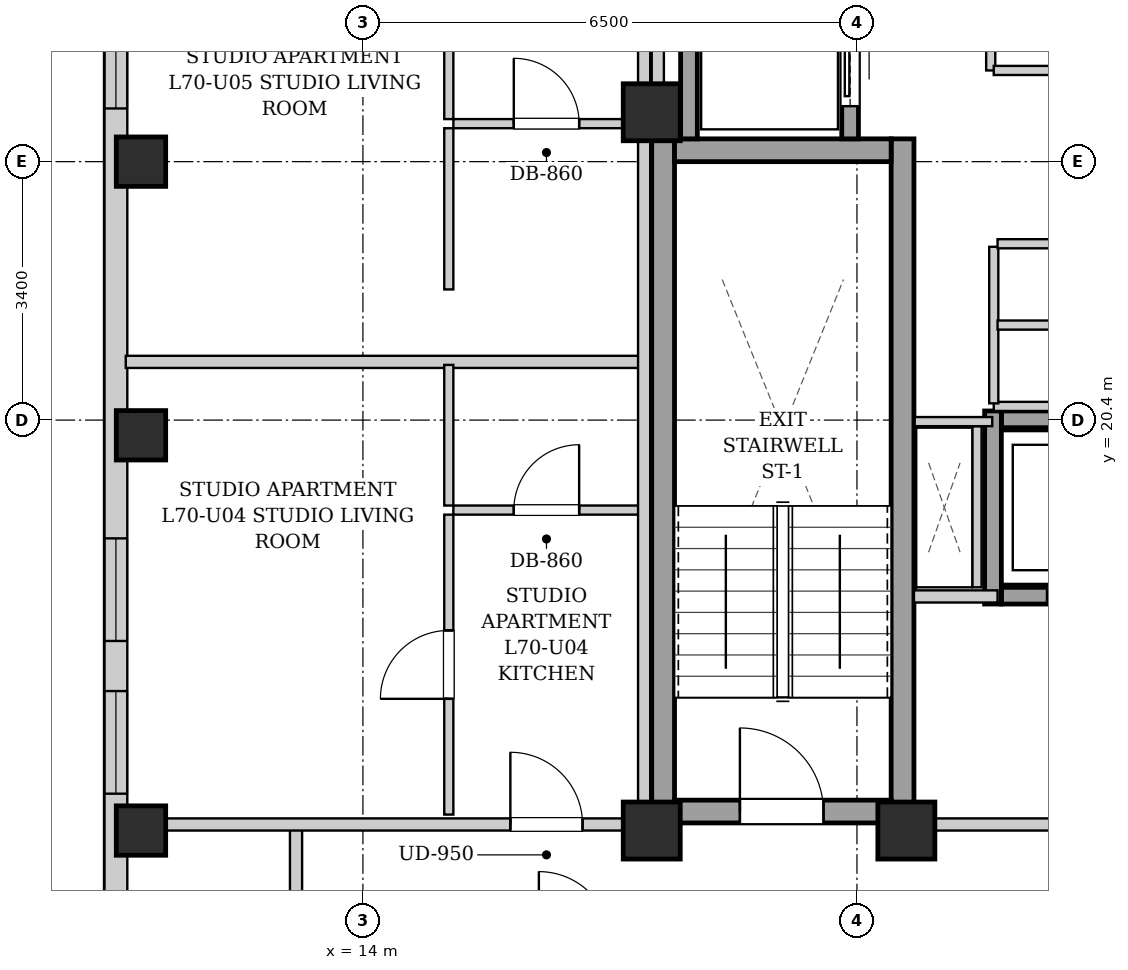
"""IFC4 building model, lengths in metres.
Left out: names, types, materials, properties, quantities, classifications, styles, units other than length and angle.
Written with IfcOpenShell. Run it as: python <this file> out.ifc"""

import sys

from ifc_helpers import new_model, si_unit, direction, frame, frame_2d, origin, origin_2d, place, context, subcontext, project, spatial, rectangle, extrude, element, fill, save


model = new_model("IFC4")
c1 = context("Model", 3, precision=1e-05, world=origin(), true_north=direction((0.0, 1.0)))
c2 = subcontext(c1, "Body", "Model", "MODEL_VIEW")
j1 = project(units=[si_unit("LENGTHUNIT", "METRE"), si_unit("PLANEANGLEUNIT", "RADIAN")], contexts=[c1])
p1 = place(None, origin())
s1 = spatial("IfcSite", under=j1, at=p1, CompositionType="ELEMENT")
p2 = place(p1, origin())
s2 = spatial("IfcBuilding", under=s1, at=p2, CompositionType="ELEMENT")
p3 = place(p2, frame((0.0, 0.0, 241.1)))
s3 = spatial("IfcBuildingStorey", under=s2, at=p3, CompositionType="ELEMENT", Elevation=241.1)
for number, where, z_axis, x_axis in (
    (1, (11.08, 15.0, 0.0), (0.0, 0.0, 1.0), (1.0, 0.0, 0.0)),
    (2, (11.08, 20.2, 0.0), (0.0, 0.0, 1.0), (1.0, 0.0, 0.0)),
    (3, (11.08, 23.8, 0.0), (0.0, 0.0, 1.0), (1.0, 0.0, 0.0)),
):
    element("IfcColumn", number, at=place(p3, frame(where, z_axis=z_axis, x_axis=x_axis)), inside=s3, PredefinedType="COLUMN", context=c2, shape_type="SweptSolid", body=[
        extrude(rectangle(XDim=0.65, YDim=0.65, at=origin_2d()), origin(), (0.0, 0.0, 1.0), 3.4),
    ])
for number, where, z_axis, x_axis in (
    (4, (17.8, 15.0, 0.0), (0.0, 0.0, 1.0), (1.0, 0.0, 0.0)),
    (5, (21.15, 15.0, 0.0), (0.0, 0.0, 1.0), (1.0, 0.0, 0.0)),
    (6, (17.8, 24.45, 0.0), (0.0, 0.0, 1.0), (1.0, 0.0, 0.0)),
):
    element("IfcColumn", number, at=place(p3, frame(where, z_axis=z_axis, x_axis=x_axis)), inside=s3, PredefinedType="COLUMN", context=c2, shape_type="SweptSolid", body=[
        extrude(rectangle(XDim=0.75, YDim=0.75, at=origin_2d()), origin(), (0.0, 0.0, 1.0), 3.4),
    ])
p4 = place(p3, frame((10.75, 6.3, 0.0), z_axis=(0.0, 0.0, 1.0), x_axis=(0.0, 1.0, 0.0)))
e7 = element("IfcWall", 7, at=p4, inside=s3, PredefinedType="SOLIDWALL", context=c2, shape_type="SweptSolid", body=[
    extrude(rectangle(XDim=31.4, YDim=0.3, at=frame_2d((15.7, 0.0))), origin(), (0.0, 0.0, 1.0), 3.14),
])
p5 = place(p4, frame((1.653, 0.0, 0.55)))
e8 = element("IfcOpeningElement", 8, at=p5, cuts=e7, PredefinedType="OPENING", context=c2, shape_type="SweptSolid", body=[
    extrude(rectangle(XDim=1.35, YDim=1.2, at=frame_2d((0.675, 0.6))), frame((0.0, 0.16, 0.0), z_axis=(0.0, -1.0, 0.0), x_axis=(1.0, 0.0, 0.0)), (0.0, 0.0, 1.0), 0.32),
])
p6 = place(p4, frame((11.194, 0.0, 0.55)))
e9 = element("IfcOpeningElement", 9, at=p6, cuts=e7, PredefinedType="OPENING", context=c2, shape_type="SweptSolid", body=[
    extrude(rectangle(XDim=1.35, YDim=1.2, at=frame_2d((0.675, 0.6))), frame((0.0, 0.16, 0.0), z_axis=(0.0, -1.0, 0.0), x_axis=(1.0, 0.0, 0.0)), (0.0, 0.0, 1.0), 0.32),
])
p7 = place(p4, frame((9.185, 0.0, 0.55)))
e10 = element("IfcOpeningElement", 10, at=p7, cuts=e7, PredefinedType="OPENING", context=c2, shape_type="SweptSolid", body=[
    extrude(rectangle(XDim=1.35, YDim=1.2, at=frame_2d((0.675, 0.6))), frame((0.0, 0.16, 0.0), z_axis=(0.0, -1.0, 0.0), x_axis=(1.0, 0.0, 0.0)), (0.0, 0.0, 1.0), 0.32),
])
p8 = place(p4, frame((18.2, 0.0, 0.55)))
e11 = element("IfcOpeningElement", 11, at=p8, cuts=e7, PredefinedType="OPENING", context=c2, shape_type="SweptSolid", body=[
    extrude(rectangle(XDim=1.35, YDim=1.2, at=frame_2d((0.675, 0.6))), frame((0.0, 0.16, 0.0), z_axis=(0.0, -1.0, 0.0), x_axis=(1.0, 0.0, 0.0)), (0.0, 0.0, 1.0), 0.32),
])
p9 = place(p4, frame((19.81, 0.0, 0.55)))
e12 = element("IfcOpeningElement", 12, at=p9, cuts=e7, PredefinedType="OPENING", context=c2, shape_type="SweptSolid", body=[
    extrude(rectangle(XDim=1.35, YDim=1.2, at=frame_2d((0.675, 0.6))), frame((0.0, 0.16, 0.0), z_axis=(0.0, -1.0, 0.0), x_axis=(1.0, 0.0, 0.0)), (0.0, 0.0, 1.0), 0.32),
])
for number, where, z_axis, x_axis in (
    (13, (17.95, 15.1, 0.0), (0.0, 0.0, 1.0), (0.0, 1.0, 0.0)),
    (14, (21.1, 15.1, 0.0), (0.0, 0.0, 1.0), (0.0, 1.0, 0.0)),
):
    element("IfcWall", number, at=place(p3, frame(where, z_axis=z_axis, x_axis=x_axis)), inside=s3, PredefinedType="SHEAR", context=c2, shape_type="SweptSolid", body=[
        extrude(rectangle(XDim=9.0, YDim=0.3, at=frame_2d((4.5, 0.0))), origin(), (0.0, 0.0, 1.0), 3.14),
    ])
p10 = place(p3, frame((18.1, 23.95, 0.0), z_axis=(0.0, 0.0, 1.0), x_axis=(1.0, 0.0, 0.0)))
e15 = element("IfcWall", 15, at=p10, inside=s3, PredefinedType="SHEAR", context=c2, shape_type="SweptSolid", body=[
    extrude(rectangle(XDim=2.85, YDim=0.3, at=frame_2d((1.425, 0.0))), origin(), (0.0, 0.0, 1.0), 3.14),
])
p11 = place(p3, frame((18.1, 15.25, 0.0), z_axis=(0.0, 0.0, 1.0), x_axis=(1.0, 0.0, 0.0)))
e16 = element("IfcWall", 16, at=p11, inside=s3, PredefinedType="SHEAR", context=c2, shape_type="SweptSolid", body=[
    extrude(rectangle(XDim=2.85, YDim=0.3, at=frame_2d((1.425, 0.0))), origin(), (0.0, 0.0, 1.0), 3.14),
])
p12 = place(p11, frame((0.86, 0.0, 0.0)))
e17 = element("IfcOpeningElement", 17, at=p12, cuts=e16, PredefinedType="OPENING", context=c2, shape_type="SweptSolid", body=[
    extrude(rectangle(XDim=1.1, YDim=2.05, at=frame_2d((0.55, 1.025))), frame((0.0, 0.16, 0.0), z_axis=(0.0, -1.0, 0.0), x_axis=(1.0, 0.0, 0.0)), (0.0, 0.0, 1.0), 0.32),
])
p13 = place(p3, frame((18.29, 24.1, 0.0), z_axis=(0.0, 0.0, 1.0), x_axis=(0.0, 1.0, 0.0)))
e18 = element("IfcWall", 18, at=p13, inside=s3, PredefinedType="SHEAR", context=c2, shape_type="SweptSolid", body=[
    extrude(rectangle(XDim=4.14, YDim=0.22, at=frame_2d((2.07, 0.0))), origin(), (0.0, 0.0, 1.0), 3.14),
])
p14 = place(p3, frame((20.41, 24.1, 0.0), z_axis=(0.0, 0.0, 1.0), x_axis=(0.0, 1.0, 0.0)))
e19 = element("IfcWall", 19, at=p14, inside=s3, PredefinedType="SHEAR", context=c2, shape_type="SweptSolid", body=[
    extrude(rectangle(XDim=1.96, YDim=0.22, at=frame_2d((0.98, 0.0))), origin(), (0.0, 0.0, 1.0), 3.14),
])
p15 = place(p14, frame((0.43, 0.0, 0.0)))
e20 = element("IfcOpeningElement", 20, at=p15, cuts=e19, PredefinedType="OPENING", context=c2, shape_type="SweptSolid", body=[
    extrude(rectangle(XDim=1.1, YDim=2.15, at=frame_2d((0.55, 1.075))), frame((0.0, 0.12, 0.0), z_axis=(0.0, -1.0, 0.0), x_axis=(1.0, 0.0, 0.0)), (0.0, 0.0, 1.0), 0.24),
])
p16 = place(p3, frame((22.4, 18.09, 0.0), z_axis=(0.0, 0.0, 1.0), x_axis=(1.0, 0.0, 0.0)))
e21 = element("IfcWall", 21, at=p16, inside=s3, PredefinedType="SHEAR", context=c2, shape_type="SweptSolid", body=[
    extrude(rectangle(XDim=2.4, YDim=0.22, at=frame_2d((1.2, 0.0))), origin(), (0.0, 0.0, 1.0), 3.14),
])
p17 = place(p16, frame((0.6, 0.0, 0.0)))
e22 = element("IfcOpeningElement", 22, at=p17, cuts=e21, PredefinedType="OPENING", context=c2, shape_type="SweptSolid", body=[
    extrude(rectangle(XDim=1.2, YDim=2.15, at=frame_2d((0.6, 1.075))), frame((0.0, 0.12, 0.0), z_axis=(0.0, -1.0, 0.0), x_axis=(1.0, 0.0, 0.0)), (0.0, 0.0, 1.0), 0.24),
])
p18 = place(p3, frame((22.4, 20.41, 0.0), z_axis=(0.0, 0.0, 1.0), x_axis=(1.0, 0.0, 0.0)))
e23 = element("IfcWall", 23, at=p18, inside=s3, PredefinedType="SHEAR", context=c2, shape_type="SweptSolid", body=[
    extrude(rectangle(XDim=2.4, YDim=0.22, at=frame_2d((1.2, 0.0))), origin(), (0.0, 0.0, 1.0), 3.14),
])
p19 = place(p3, frame((22.29, 17.98, 0.0), z_axis=(0.0, 0.0, 1.0), x_axis=(0.0, 1.0, 0.0)))
e24 = element("IfcWall", 24, at=p19, inside=s3, PredefinedType="SHEAR", context=c2, shape_type="SweptSolid", body=[
    extrude(rectangle(XDim=2.54, YDim=0.22, at=frame_2d((1.27, 0.0))), origin(), (0.0, 0.0, 1.0), 3.14),
])
p20 = place(p3, frame((21.25, 15.08, 0.0), z_axis=(0.0, 0.0, 1.0), x_axis=(1.0, 0.0, 0.0)))
e25 = element("IfcWall", 25, at=p20, inside=s3, PredefinedType="PARTITIONING", context=c2, shape_type="SweptSolid", body=[
    extrude(rectangle(XDim=8.5, YDim=0.16, at=frame_2d((4.25, 0.0))), origin(), (0.0, 0.0, 1.0), 2.668),
])
p21 = place(p20, frame((3.725, 0.0, 0.0)))
e26 = element("IfcOpeningElement", 26, at=p21, cuts=e25, PredefinedType="OPENING", context=c2, shape_type="SweptSolid", body=[
    extrude(rectangle(XDim=1.05, YDim=2.05, at=frame_2d((0.525, 1.025))), frame((0.0, 0.09, 0.0), z_axis=(0.0, -1.0, 0.0), x_axis=(1.0, 0.0, 0.0)), (0.0, 0.0, 1.0), 0.18),
])
p22 = place(p3, frame((21.25, 18.08, 0.0), z_axis=(0.0, 0.0, 1.0), x_axis=(1.0, 0.0, 0.0)))
e27 = element("IfcWall", 27, at=p22, inside=s3, PredefinedType="PARTITIONING", context=c2, shape_type="SweptSolid", body=[
    extrude(rectangle(XDim=1.1, YDim=0.16, at=frame_2d((0.55, 0.0))), origin(), (0.0, 0.0, 1.0), 3.14),
])
p23 = place(p3, frame((17.88, 24.12, 0.0), z_axis=(0.0, 0.0, 1.0), x_axis=(0.0, 1.0, 0.0)))
e28 = element("IfcWall", 28, at=p23, inside=s3, PredefinedType="PARTITIONING", context=c2, shape_type="SweptSolid", body=[
    extrude(rectangle(XDim=4.76, YDim=0.16, at=frame_2d((2.38, 0.0))), origin(), (0.0, 0.0, 1.0), 3.14),
])
p24 = place(p3, frame((22.08, 18.2, 0.0), z_axis=(0.0, 0.0, 1.0), x_axis=(0.0, 1.0, 0.0)))
e29 = element("IfcWall", 29, at=p24, inside=s3, PredefinedType="PARTITIONING", context=c2, shape_type="SweptSolid", body=[
    extrude(rectangle(XDim=2.12, YDim=0.12, at=frame_2d((1.06, 0.0))), origin(), (0.0, 0.0, 1.0), 3.14),
])
p25 = place(p3, frame((22.28, 20.38, 0.0), z_axis=(0.0, 0.0, 1.0), x_axis=(-1.0, 0.0, 0.0)))
e30 = element("IfcWall", 30, at=p25, inside=s3, PredefinedType="PARTITIONING", context=c2, shape_type="SweptSolid", body=[
    extrude(rectangle(XDim=1.02, YDim=0.12, at=frame_2d((0.51, 0.0))), origin(), (0.0, 0.0, 1.0), 3.14),
])
p26 = place(p3, frame((22.26, 25.0, 0.0), z_axis=(0.0, 0.0, 1.0), x_axis=(0.0, 1.0, 0.0)))
e31 = element("IfcWall", 31, at=p26, inside=s3, PredefinedType="PARTITIONING", context=c2, shape_type="SweptSolid", body=[
    extrude(rectangle(XDim=3.86, YDim=0.12, at=frame_2d((1.93, 0.0))), origin(), (0.0, 0.0, 1.0), 3.14),
])
p27 = place(p3, frame((22.3, 25.0, 0.0), z_axis=(0.0, 0.0, 1.0), x_axis=(1.0, 0.0, 0.0)))
e32 = element("IfcWall", 32, at=p27, inside=s3, PredefinedType="PARTITIONING", context=c2, shape_type="SweptSolid", body=[
    extrude(rectangle(XDim=2.04, YDim=0.12, at=frame_2d((1.02, 0.0))), origin(), (0.0, 0.0, 1.0), 3.14),
])
p28 = place(p3, frame((22.3, 20.58, 0.0), z_axis=(0.0, 0.0, 1.0), x_axis=(1.0, 0.0, 0.0)))
e33 = element("IfcWall", 33, at=p28, inside=s3, PredefinedType="PARTITIONING", context=c2, shape_type="SweptSolid", body=[
    extrude(rectangle(XDim=7.35, YDim=0.12, at=frame_2d((3.675, 0.0))), origin(), (0.0, 0.0, 1.0), 3.14),
])
p29 = place(p3, frame((22.3, 20.62, 0.0), z_axis=(0.0, 0.0, 1.0), x_axis=(0.0, 1.0, 0.0)))
e34 = element("IfcWall", 34, at=p29, inside=s3, PredefinedType="PARTITIONING", context=c2, shape_type="SweptSolid", body=[
    extrude(rectangle(XDim=2.06, YDim=0.12, at=frame_2d((1.03, 0.0))), origin(), (0.0, 0.0, 1.0), 3.14),
])
p30 = place(p3, frame((22.35, 21.65, 0.0), z_axis=(0.0, 0.0, 1.0), x_axis=(1.0, 0.0, 0.0)))
e35 = element("IfcWall", 35, at=p30, inside=s3, PredefinedType="PARTITIONING", context=c2, shape_type="SweptSolid", body=[
    extrude(rectangle(XDim=5.79, YDim=0.12, at=frame_2d((2.895, 0.0))), origin(), (0.0, 0.0, 1.0), 3.14),
])
p31 = place(p3, frame((22.35, 22.72, 0.0), z_axis=(0.0, 0.0, 1.0), x_axis=(1.0, 0.0, 0.0)))
e36 = element("IfcWall", 36, at=p31, inside=s3, PredefinedType="PARTITIONING", context=c2, shape_type="SweptSolid", body=[
    extrude(rectangle(XDim=7.27, YDim=0.12, at=frame_2d((3.635, 0.0))), origin(), (0.0, 0.0, 1.0), 3.14),
])
p32 = place(p31, frame((2.57, 0.0, 0.0)))
e37 = element("IfcOpeningElement", 37, at=p32, cuts=e36, PredefinedType="OPENING", context=c2, shape_type="SweptSolid", body=[
    extrude(rectangle(XDim=0.86, YDim=2.05, at=frame_2d((0.43, 1.025))), frame((0.0, 0.07, 0.0), z_axis=(0.0, -1.0, 0.0), x_axis=(1.0, 0.0, 0.0)), (0.0, 0.0, 1.0), 0.14),
])
p33 = place(p31, frame((6.06, 0.0, 0.0)))
e38 = element("IfcOpeningElement", 38, at=p33, cuts=e36, PredefinedType="OPENING", context=c2, shape_type="SweptSolid", body=[
    extrude(rectangle(XDim=0.86, YDim=2.05, at=frame_2d((0.43, 1.025))), frame((0.0, 0.07, 0.0), z_axis=(0.0, -1.0, 0.0), x_axis=(1.0, 0.0, 0.0)), (0.0, 0.0, 1.0), 0.14),
])
p34 = place(p3, frame((13.12, 13.51, 0.0), z_axis=(0.0, 0.0, 1.0), x_axis=(0.0, 1.0, 0.0)))
e39 = element("IfcWall", 39, at=p34, inside=s3, PredefinedType="PARTITIONING", context=c2, shape_type="SweptSolid", body=[
    extrude(rectangle(XDim=1.58, YDim=0.16, at=frame_2d((0.79, 0.0))), origin(), (0.0, 0.0, 1.0), 3.14),
])
p35 = place(p3, frame((10.88, 15.08, 0.0), z_axis=(0.0, 0.0, 1.0), x_axis=(1.0, 0.0, 0.0)))
e40 = element("IfcWall", 40, at=p35, inside=s3, PredefinedType="PARTITIONING", context=c2, shape_type="SweptSolid", body=[
    extrude(rectangle(XDim=6.88, YDim=0.16, at=frame_2d((3.44, 0.0))), origin(), (0.0, 0.0, 1.0), 2.668),
])
p36 = place(p35, frame((5.06, 0.0, 0.0)))
e41 = element("IfcOpeningElement", 41, at=p36, cuts=e40, PredefinedType="OPENING", context=c2, shape_type="SweptSolid", body=[
    extrude(rectangle(XDim=0.95, YDim=2.1, at=frame_2d((0.475, 1.05))), frame((0.0, 0.09, 0.0), z_axis=(0.0, -1.0, 0.0), x_axis=(1.0, 0.0, 0.0)), (0.0, 0.0, 1.0), 0.18),
])
p37 = place(p3, frame((10.88, 21.166, 0.0), z_axis=(0.0, 0.0, 1.0), x_axis=(1.0, 0.0, 0.0)))
e42 = element("IfcWall", 42, at=p37, inside=s3, PredefinedType="PARTITIONING", context=c2, shape_type="SweptSolid", body=[
    extrude(rectangle(XDim=6.76, YDim=0.16, at=frame_2d((3.38, 0.0))), origin(), (0.0, 0.0, 1.0), 3.14),
])
p38 = place(p3, frame((15.19, 19.216, 0.0), z_axis=(0.0, 0.0, 1.0), x_axis=(1.0, 0.0, 0.0)))
e43 = element("IfcWall", 43, at=p38, inside=s3, PredefinedType="PARTITIONING", context=c2, shape_type="SweptSolid", body=[
    extrude(rectangle(XDim=2.45, YDim=0.12, at=frame_2d((1.225, 0.0))), origin(), (0.0, 0.0, 1.0), 3.14),
])
p39 = place(p38, frame((0.795, 0.0, 0.0)))
e44 = element("IfcOpeningElement", 44, at=p39, cuts=e43, PredefinedType="OPENING", context=c2, shape_type="SweptSolid", body=[
    extrude(rectangle(XDim=0.86, YDim=2.05, at=frame_2d((0.43, 1.025))), frame((0.0, 0.07, 0.0), z_axis=(0.0, -1.0, 0.0), x_axis=(1.0, 0.0, 0.0)), (0.0, 0.0, 1.0), 0.14),
])
p40 = place(p3, frame((15.13, 19.276, 0.0), z_axis=(0.0, 0.0, 1.0), x_axis=(0.0, 1.0, 0.0)))
e45 = element("IfcWall", 45, at=p40, inside=s3, PredefinedType="PARTITIONING", context=c2, shape_type="SweptSolid", body=[
    extrude(rectangle(XDim=1.85, YDim=0.12, at=frame_2d((0.925, 0.0))), origin(), (0.0, 0.0, 1.0), 3.14),
])
p41 = place(p3, frame((15.13, 15.21, 0.0), z_axis=(0.0, 0.0, 1.0), x_axis=(0.0, 1.0, 0.0)))
e46 = element("IfcWall", 46, at=p41, inside=s3, PredefinedType="PARTITIONING", context=c2, shape_type="SweptSolid", body=[
    extrude(rectangle(XDim=3.946, YDim=0.12, at=frame_2d((1.973, 0.0))), origin(), (0.0, 0.0, 1.0), 3.14),
])
p42 = place(p41, frame((1.523, 0.0, 0.0)))
e47 = element("IfcOpeningElement", 47, at=p42, cuts=e46, PredefinedType="OPENING", context=c2, shape_type="SweptSolid", body=[
    extrude(rectangle(XDim=0.9, YDim=2.05, at=frame_2d((0.45, 1.025))), frame((0.0, 0.07, 0.0), z_axis=(0.0, -1.0, 0.0), x_axis=(1.0, 0.0, 0.0)), (0.0, 0.0, 1.0), 0.14),
])
p43 = place(p3, frame((15.19, 24.3, 0.0), z_axis=(0.0, 0.0, 1.0), x_axis=(1.0, 0.0, 0.0)))
e48 = element("IfcWall", 48, at=p43, inside=s3, PredefinedType="PARTITIONING", context=c2, shape_type="SweptSolid", body=[
    extrude(rectangle(XDim=2.45, YDim=0.12, at=frame_2d((1.225, 0.0))), origin(), (0.0, 0.0, 1.0), 3.14),
])
p44 = place(p43, frame((0.795, 0.0, 0.0)))
e49 = element("IfcOpeningElement", 49, at=p44, cuts=e48, PredefinedType="OPENING", context=c2, shape_type="SweptSolid", body=[
    extrude(rectangle(XDim=0.86, YDim=2.05, at=frame_2d((0.43, 1.025))), frame((0.0, 0.07, 0.0), z_axis=(0.0, -1.0, 0.0), x_axis=(1.0, 0.0, 0.0)), (0.0, 0.0, 1.0), 0.14),
])
p45 = place(p3, frame((15.13, 22.119, 0.0), z_axis=(0.0, 0.0, 1.0), x_axis=(0.0, 1.0, 0.0)))
e50 = element("IfcWall", 50, at=p45, inside=s3, PredefinedType="PARTITIONING", context=c2, shape_type="SweptSolid", body=[
    extrude(rectangle(XDim=2.121, YDim=0.12, at=frame_2d((1.061, 0.0))), origin(), (0.0, 0.0, 1.0), 3.14),
])
p46 = place(p3, frame((15.13, 24.36, 0.0), z_axis=(0.0, 0.0, 1.0), x_axis=(0.0, 1.0, 0.0)))
e51 = element("IfcWall", 51, at=p46, inside=s3, PredefinedType="PARTITIONING", context=c2, shape_type="SweptSolid", body=[
    extrude(rectangle(XDim=4.5, YDim=0.12, at=frame_2d((2.25, 0.0))), origin(), (0.0, 0.0, 1.0), 3.14),
])
p47 = place(p46, frame((1.8, 0.0, 0.0)))
e52 = element("IfcOpeningElement", 52, at=p47, cuts=e51, PredefinedType="OPENING", context=c2, shape_type="SweptSolid", body=[
    extrude(rectangle(XDim=0.9, YDim=2.05, at=frame_2d((0.45, 1.025))), frame((0.0, 0.07, 0.0), z_axis=(0.0, -1.0, 0.0), x_axis=(1.0, 0.0, 0.0)), (0.0, 0.0, 1.0), 0.14),
])
p48 = place(p3, frame((17.7, 15.02, 0.0), z_axis=(0.0, 0.0, 1.0), x_axis=(0.0, 1.0, 0.0)))
e53 = element("IfcWall", 53, at=p48, inside=s3, PredefinedType="PARTITIONING", context=c2, shape_type="SweptSolid", body=[
    extrude(rectangle(XDim=13.98, YDim=0.16, at=frame_2d((6.99, 0.0))), origin(), (0.0, 0.0, 1.0), 3.14),
])
p49 = place(p12, origin())
e54 = element("IfcDoor", 54, at=p49, inside=s3, OperationType="SINGLE_SWING_LEFT", PredefinedType="DOOR", context=c2, shape_type="SweptSolid", body=[
    extrude(rectangle(XDim=1.1, YDim=2.05, at=frame_2d((0.55, 1.025))), frame((0.0, 0.025, 0.0), z_axis=(0.0, -1.0, 0.0), x_axis=(1.0, 0.0, 0.0)), (0.0, 0.0, 1.0), 0.05),
])
fill(e17, e54)
p50 = place(p15, origin())
e55 = element("IfcDoor", 55, at=p50, inside=s3, OperationType="SLIDING_TO_LEFT", PredefinedType="DOOR", context=c2, shape_type="SweptSolid", body=[
    extrude(rectangle(XDim=1.1, YDim=2.15, at=frame_2d((0.55, 1.075))), frame((0.0, 0.025, 0.0), z_axis=(0.0, -1.0, 0.0), x_axis=(1.0, 0.0, 0.0)), (0.0, 0.0, 1.0), 0.05),
])
fill(e20, e55)
p51 = place(p17, origin())
e56 = element("IfcDoor", 56, at=p51, inside=s3, OperationType="SLIDING_TO_LEFT", PredefinedType="DOOR", context=c2, shape_type="SweptSolid", body=[
    extrude(rectangle(XDim=1.2, YDim=2.15, at=frame_2d((0.6, 1.075))), frame((0.0, 0.025, 0.0), z_axis=(0.0, -1.0, 0.0), x_axis=(1.0, 0.0, 0.0)), (0.0, 0.0, 1.0), 0.05),
])
fill(e22, e56)
p52 = place(p36, origin())
e57 = element("IfcDoor", 57, at=p52, inside=s3, OperationType="SINGLE_SWING_LEFT", PredefinedType="DOOR", context=c2, shape_type="SweptSolid", body=[
    extrude(rectangle(XDim=0.95, YDim=2.1, at=frame_2d((0.475, 1.05))), frame((0.0, 0.025, 0.0), z_axis=(0.0, -1.0, 0.0), x_axis=(1.0, 0.0, 0.0)), (0.0, 0.0, 1.0), 0.05),
])
fill(e41, e57)
p53 = place(p39, origin())
e58 = element("IfcDoor", 58, at=p53, inside=s3, OperationType="SINGLE_SWING_RIGHT", PredefinedType="DOOR", context=c2, shape_type="SweptSolid", body=[
    extrude(rectangle(XDim=0.86, YDim=2.05, at=frame_2d((0.43, 1.025))), frame((0.0, 0.025, 0.0), z_axis=(0.0, -1.0, 0.0), x_axis=(1.0, 0.0, 0.0)), (0.0, 0.0, 1.0), 0.05),
])
fill(e44, e58)
p54 = place(p42, origin())
e59 = element("IfcDoor", 59, at=p54, inside=s3, OperationType="SINGLE_SWING_LEFT", PredefinedType="DOOR", context=c2, shape_type="SweptSolid", body=[
    extrude(rectangle(XDim=0.9, YDim=2.05, at=frame_2d((0.45, 1.025))), frame((0.0, 0.025, 0.0), z_axis=(0.0, -1.0, 0.0), x_axis=(1.0, 0.0, 0.0)), (0.0, 0.0, 1.0), 0.05),
])
fill(e47, e59)
p55 = place(p44, origin())
e60 = element("IfcDoor", 60, at=p55, inside=s3, OperationType="SINGLE_SWING_LEFT", PredefinedType="DOOR", context=c2, shape_type="SweptSolid", body=[
    extrude(rectangle(XDim=0.86, YDim=2.05, at=frame_2d((0.43, 1.025))), frame((0.0, 0.025, 0.0), z_axis=(0.0, -1.0, 0.0), x_axis=(1.0, 0.0, 0.0)), (0.0, 0.0, 1.0), 0.05),
])
fill(e49, e60)
p56 = place(p6, origin())
e61 = element("IfcWindow", 61, at=p56, inside=s3, PartitioningType="SINGLE_PANEL", PredefinedType="WINDOW", context=c2, shape_type="SweptSolid", body=[
    extrude(rectangle(XDim=1.35, YDim=1.2, at=frame_2d((0.675, 0.6))), frame((0.0, 0.03, 0.0), z_axis=(0.0, -1.0, 0.0), x_axis=(1.0, 0.0, 0.0)), (0.0, 0.0, 1.0), 0.06),
])
fill(e9, e61)
p57 = place(p7, origin())
e62 = element("IfcWindow", 62, at=p57, inside=s3, PartitioningType="SINGLE_PANEL", PredefinedType="WINDOW", context=c2, shape_type="SweptSolid", body=[
    extrude(rectangle(XDim=1.35, YDim=1.2, at=frame_2d((0.675, 0.6))), frame((0.0, 0.03, 0.0), z_axis=(0.0, -1.0, 0.0), x_axis=(1.0, 0.0, 0.0)), (0.0, 0.0, 1.0), 0.06),
])
fill(e10, e62)
p58 = place(p8, origin())
e63 = element("IfcWindow", 63, at=p58, inside=s3, PartitioningType="SINGLE_PANEL", PredefinedType="WINDOW", context=c2, shape_type="SweptSolid", body=[
    extrude(rectangle(XDim=1.35, YDim=1.2, at=frame_2d((0.675, 0.6))), frame((0.0, 0.03, 0.0), z_axis=(0.0, -1.0, 0.0), x_axis=(1.0, 0.0, 0.0)), (0.0, 0.0, 1.0), 0.06),
])
fill(e11, e63)
save(model, sys.argv[1])
